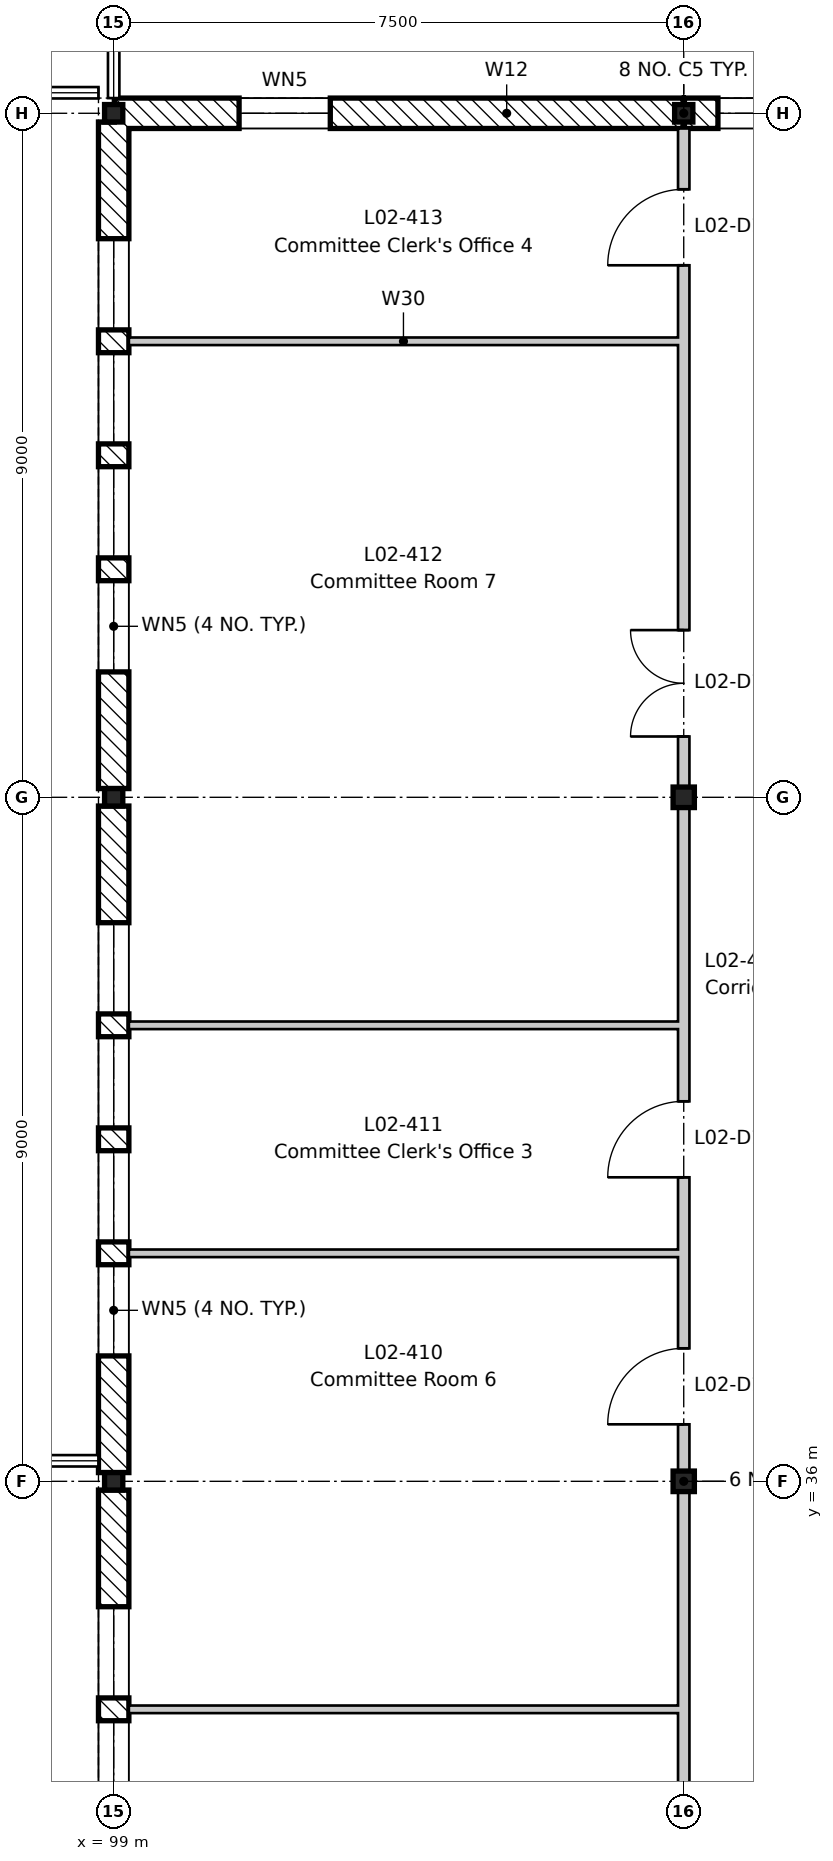
"""IFC4 building model, lengths in metres.
Left out: names, types, materials, properties, quantities, classifications, styles, units other than length and angle.
Written with IfcOpenShell. Run it as: python <this file> out.ifc"""

import sys

from ifc_helpers import new_model, si_unit, direction, frame, frame_2d, origin, origin_2d, place, context, subcontext, project, spatial, rectangle, i_section, extrude, element, fill, save


model = new_model("IFC4")
c1 = context("Model", 3, precision=1e-05, world=origin(), true_north=direction((0.0, 1.0)))
c2 = subcontext(c1, "Body", "Model", "MODEL_VIEW")
j1 = project(units=[si_unit("LENGTHUNIT", "METRE"), si_unit("PLANEANGLEUNIT", "RADIAN")], contexts=[c1])
p1 = place(None, origin())
s1 = spatial("IfcSite", under=j1, at=p1, CompositionType="ELEMENT")
p2 = place(p1, origin())
s2 = spatial("IfcBuilding", under=s1, at=p2, CompositionType="ELEMENT")
p3 = place(p2, frame((0.0, 0.0, 9.9)))
s3 = spatial("IfcBuildingStorey", under=s2, at=p3, CompositionType="ELEMENT", Elevation=9.9)
for number, where, z_axis, x_axis in (
    (1, (99.0, 36.0, -0.2), (0.0, 0.0, 1.0), (1.0, 0.0, 0.0)),
    (2, (99.0, 45.0, -0.2), (0.0, 0.0, 1.0), (1.0, 0.0, 0.0)),
    (3, (99.0, 54.0, -0.2), (0.0, 0.0, 1.0), (1.0, 0.0, 0.0)),
):
    element("IfcColumn", number, at=place(p3, frame(where, z_axis=z_axis, x_axis=x_axis)), inside=s3, PredefinedType="COLUMN", context=c2, shape_type="SweptSolid", body=[
        extrude(i_section(OverallWidth=0.24, OverallDepth=0.23, WebThickness=0.008, FlangeThickness=0.012, FilletRadius=0.021, at=origin_2d()), origin(), (0.0, 0.0, 1.0), 4.5),
    ])
for number, where, z_axis, x_axis in (
    (4, (106.5, 36.0, -0.2), (0.0, 0.0, 1.0), (1.0, 0.0, 0.0)),
    (5, (106.5, 45.0, -0.2), (0.0, 0.0, 1.0), (1.0, 0.0, 0.0)),
):
    element("IfcColumn", number, at=place(p3, frame(where, z_axis=z_axis, x_axis=x_axis)), inside=s3, PredefinedType="COLUMN", context=c2, shape_type="SweptSolid", body=[
        extrude(i_section(OverallWidth=0.28, OverallDepth=0.27, WebThickness=0.008, FlangeThickness=0.013, FilletRadius=0.024, at=origin_2d()), origin(), (0.0, 0.0, 1.0), 4.5),
    ])
p4 = place(p3, frame((106.5, 54.0, -0.2), z_axis=(0.0, 0.0, 1.0), x_axis=(1.0, 0.0, 0.0)))
e6 = element("IfcColumn", 6, at=p4, inside=s3, PredefinedType="COLUMN", context=c2, shape_type="SweptSolid", body=[
    extrude(i_section(OverallWidth=0.24, OverallDepth=0.23, WebThickness=0.008, FlangeThickness=0.012, FilletRadius=0.021, at=origin_2d()), origin(), (0.0, 0.0, 1.0), 4.5),
])
p5 = place(p3, frame((99.0, 27.115, 0.0), z_axis=(0.0, 0.0, 1.0), x_axis=(0.0, 1.0, 0.0)))
e7 = element("IfcWall", 7, at=p5, inside=s3, PredefinedType="STANDARD", context=c2, shape_type="SweptSolid", body=[
    extrude(rectangle(XDim=8.77, YDim=0.4, at=frame_2d((4.385, 0.0))), origin(), (0.0, 0.0, 1.0), 3.9),
])
p6 = place(p5, frame((1.535, 0.0, 0.6)))
e8 = element("IfcOpeningElement", 8, at=p6, cuts=e7, PredefinedType="OPENING", context=c2, shape_type="SweptSolid", body=[
    extrude(rectangle(XDim=1.2, YDim=3.0, at=frame_2d((0.6, 1.5))), frame((0.0, 0.21, 0.0), z_axis=(0.0, -1.0, 0.0), x_axis=(1.0, 0.0, 0.0)), (0.0, 0.0, 1.0), 0.42),
])
p7 = place(p5, frame((3.035, 0.0, 0.6)))
e9 = element("IfcOpeningElement", 9, at=p7, cuts=e7, PredefinedType="OPENING", context=c2, shape_type="SweptSolid", body=[
    extrude(rectangle(XDim=1.2, YDim=3.0, at=frame_2d((0.6, 1.5))), frame((0.0, 0.21, 0.0), z_axis=(0.0, -1.0, 0.0), x_axis=(1.0, 0.0, 0.0)), (0.0, 0.0, 1.0), 0.42),
])
p8 = place(p5, frame((4.535, 0.0, 0.6)))
e10 = element("IfcOpeningElement", 10, at=p8, cuts=e7, PredefinedType="OPENING", context=c2, shape_type="SweptSolid", body=[
    extrude(rectangle(XDim=1.2, YDim=3.0, at=frame_2d((0.6, 1.5))), frame((0.0, 0.21, 0.0), z_axis=(0.0, -1.0, 0.0), x_axis=(1.0, 0.0, 0.0)), (0.0, 0.0, 1.0), 0.42),
])
p9 = place(p5, frame((6.035, 0.0, 0.6)))
e11 = element("IfcOpeningElement", 11, at=p9, cuts=e7, PredefinedType="OPENING", context=c2, shape_type="SweptSolid", body=[
    extrude(rectangle(XDim=1.2, YDim=3.0, at=frame_2d((0.6, 1.5))), frame((0.0, 0.21, 0.0), z_axis=(0.0, -1.0, 0.0), x_axis=(1.0, 0.0, 0.0)), (0.0, 0.0, 1.0), 0.42),
])
p10 = place(p3, frame((99.0, 36.115, 0.0), z_axis=(0.0, 0.0, 1.0), x_axis=(0.0, 1.0, 0.0)))
e12 = element("IfcWall", 12, at=p10, inside=s3, PredefinedType="STANDARD", context=c2, shape_type="SweptSolid", body=[
    extrude(rectangle(XDim=8.77, YDim=0.4, at=frame_2d((4.385, 0.0))), origin(), (0.0, 0.0, 1.0), 3.9),
])
p11 = place(p10, frame((1.535, 0.0, 0.6)))
e13 = element("IfcOpeningElement", 13, at=p11, cuts=e12, PredefinedType="OPENING", context=c2, shape_type="SweptSolid", body=[
    extrude(rectangle(XDim=1.2, YDim=3.0, at=frame_2d((0.6, 1.5))), frame((0.0, 0.21, 0.0), z_axis=(0.0, -1.0, 0.0), x_axis=(1.0, 0.0, 0.0)), (0.0, 0.0, 1.0), 0.42),
])
p12 = place(p10, frame((3.035, 0.0, 0.6)))
e14 = element("IfcOpeningElement", 14, at=p12, cuts=e12, PredefinedType="OPENING", context=c2, shape_type="SweptSolid", body=[
    extrude(rectangle(XDim=1.2, YDim=3.0, at=frame_2d((0.6, 1.5))), frame((0.0, 0.21, 0.0), z_axis=(0.0, -1.0, 0.0), x_axis=(1.0, 0.0, 0.0)), (0.0, 0.0, 1.0), 0.42),
])
p13 = place(p10, frame((4.535, 0.0, 0.6)))
e15 = element("IfcOpeningElement", 15, at=p13, cuts=e12, PredefinedType="OPENING", context=c2, shape_type="SweptSolid", body=[
    extrude(rectangle(XDim=1.2, YDim=3.0, at=frame_2d((0.6, 1.5))), frame((0.0, 0.21, 0.0), z_axis=(0.0, -1.0, 0.0), x_axis=(1.0, 0.0, 0.0)), (0.0, 0.0, 1.0), 0.42),
])
p14 = place(p10, frame((6.035, 0.0, 0.6)))
e16 = element("IfcOpeningElement", 16, at=p14, cuts=e12, PredefinedType="OPENING", context=c2, shape_type="SweptSolid", body=[
    extrude(rectangle(XDim=1.2, YDim=3.0, at=frame_2d((0.6, 1.5))), frame((0.0, 0.21, 0.0), z_axis=(0.0, -1.0, 0.0), x_axis=(1.0, 0.0, 0.0)), (0.0, 0.0, 1.0), 0.42),
])
p15 = place(p3, frame((99.0, 45.115, 0.0), z_axis=(0.0, 0.0, 1.0), x_axis=(0.0, 1.0, 0.0)))
e17 = element("IfcWall", 17, at=p15, inside=s3, PredefinedType="STANDARD", context=c2, shape_type="SweptSolid", body=[
    extrude(rectangle(XDim=8.77, YDim=0.4, at=frame_2d((4.385, 0.0))), origin(), (0.0, 0.0, 1.0), 3.9),
])
p16 = place(p15, frame((1.535, 0.0, 0.6)))
e18 = element("IfcOpeningElement", 18, at=p16, cuts=e17, PredefinedType="OPENING", context=c2, shape_type="SweptSolid", body=[
    extrude(rectangle(XDim=1.2, YDim=3.0, at=frame_2d((0.6, 1.5))), frame((0.0, 0.21, 0.0), z_axis=(0.0, -1.0, 0.0), x_axis=(1.0, 0.0, 0.0)), (0.0, 0.0, 1.0), 0.42),
])
p17 = place(p15, frame((3.035, 0.0, 0.6)))
e19 = element("IfcOpeningElement", 19, at=p17, cuts=e17, PredefinedType="OPENING", context=c2, shape_type="SweptSolid", body=[
    extrude(rectangle(XDim=1.2, YDim=3.0, at=frame_2d((0.6, 1.5))), frame((0.0, 0.21, 0.0), z_axis=(0.0, -1.0, 0.0), x_axis=(1.0, 0.0, 0.0)), (0.0, 0.0, 1.0), 0.42),
])
p18 = place(p15, frame((4.535, 0.0, 0.6)))
e20 = element("IfcOpeningElement", 20, at=p18, cuts=e17, PredefinedType="OPENING", context=c2, shape_type="SweptSolid", body=[
    extrude(rectangle(XDim=1.2, YDim=3.0, at=frame_2d((0.6, 1.5))), frame((0.0, 0.21, 0.0), z_axis=(0.0, -1.0, 0.0), x_axis=(1.0, 0.0, 0.0)), (0.0, 0.0, 1.0), 0.42),
])
p19 = place(p15, frame((6.035, 0.0, 0.6)))
e21 = element("IfcOpeningElement", 21, at=p19, cuts=e17, PredefinedType="OPENING", context=c2, shape_type="SweptSolid", body=[
    extrude(rectangle(XDim=1.2, YDim=3.0, at=frame_2d((0.6, 1.5))), frame((0.0, 0.21, 0.0), z_axis=(0.0, -1.0, 0.0), x_axis=(1.0, 0.0, 0.0)), (0.0, 0.0, 1.0), 0.42),
])
p20 = place(p3, frame((99.009, 54.0, 0.0), z_axis=(0.0, 0.0, 1.0), x_axis=(1.0, 0.0, 0.0)))
e22 = element("IfcWall", 22, at=p20, inside=s3, PredefinedType="STANDARD", context=c2, shape_type="SweptSolid", body=[
    extrude(rectangle(XDim=7.482, YDim=0.4, at=frame_2d((3.741, 0.0))), origin(), (0.0, 0.0, 1.0), 3.97),
])
p21 = place(p20, frame((1.641, 0.0, 0.6)))
e23 = element("IfcOpeningElement", 23, at=p21, cuts=e22, PredefinedType="OPENING", context=c2, shape_type="SweptSolid", body=[
    extrude(rectangle(XDim=1.2, YDim=3.0, at=frame_2d((0.6, 1.5))), frame((0.0, 0.21, 0.0), z_axis=(0.0, -1.0, 0.0), x_axis=(1.0, 0.0, 0.0)), (0.0, 0.0, 1.0), 0.42),
])
p22 = place(p3, frame((106.509, 54.0, 0.0), z_axis=(0.0, 0.0, 1.0), x_axis=(1.0, 0.0, 0.0)))
e24 = element("IfcWall", 24, at=p22, inside=s3, PredefinedType="STANDARD", context=c2, shape_type="SweptSolid", body=[
    extrude(rectangle(XDim=2.982, YDim=0.4, at=frame_2d((1.491, 0.0))), origin(), (0.0, 0.0, 1.0), 4.1),
])
p23 = place(p22, frame((0.441, 0.0, 0.9)))
e25 = element("IfcOpeningElement", 25, at=p23, cuts=e24, PredefinedType="OPENING", context=c2, shape_type="SweptSolid", body=[
    extrude(rectangle(XDim=2.1, YDim=2.1, at=frame_2d((1.05, 1.05))), frame((0.0, 0.21, 0.0), z_axis=(0.0, -1.0, 0.0), x_axis=(1.0, 0.0, 0.0)), (0.0, 0.0, 1.0), 0.42),
])
for number, where, z_axis, x_axis in (
    (26, (99.2, 33.0, 0.0), (0.0, 0.0, 1.0), (1.0, 0.0, 0.0)),
    (27, (99.2, 39.0, 0.0), (0.0, 0.0, 1.0), (1.0, 0.0, 0.0)),
    (28, (99.2, 42.0, 0.0), (0.0, 0.0, 1.0), (1.0, 0.0, 0.0)),
    (29, (99.2, 51.0, 0.0), (0.0, 0.0, 1.0), (1.0, 0.0, 0.0)),
):
    element("IfcWall", number, at=place(p3, frame(where, z_axis=z_axis, x_axis=x_axis)), inside=s3, PredefinedType="PARTITIONING", context=c2, shape_type="SweptSolid", body=[
        extrude(rectangle(XDim=7.225, YDim=0.1, at=frame_2d((3.613, 0.0))), origin(), (0.0, 0.0, 1.0), 4.3),
    ])
p24 = place(p3, frame((106.5, 0.2, 0.0), z_axis=(0.0, 0.0, 1.0), x_axis=(0.0, 1.0, 0.0)))
e30 = element("IfcWall", 30, at=p24, inside=s3, PredefinedType="PARTITIONING", context=c2, shape_type="SweptSolid", body=[
    extrude(rectangle(XDim=53.6, YDim=0.15, at=frame_2d((26.8, 0.0))), origin(), (0.0, 0.0, 1.0), 3.78),
])
p25 = place(p24, frame((2.3, 0.0, 0.0)))
e31 = element("IfcOpeningElement", 31, at=p25, cuts=e30, PredefinedType="OPENING", context=c2, shape_type="SweptSolid", body=[
    extrude(rectangle(XDim=1.0, YDim=2.1, at=frame_2d((0.5, 1.05))), frame((0.0, 0.085, 0.0), z_axis=(0.0, -1.0, 0.0), x_axis=(1.0, 0.0, 0.0)), (0.0, 0.0, 1.0), 0.17),
])
p26 = place(p24, frame((6.8, 0.0, 0.0)))
e32 = element("IfcOpeningElement", 32, at=p26, cuts=e30, PredefinedType="OPENING", context=c2, shape_type="SweptSolid", body=[
    extrude(rectangle(XDim=1.0, YDim=2.1, at=frame_2d((0.5, 1.05))), frame((0.0, 0.085, 0.0), z_axis=(0.0, -1.0, 0.0), x_axis=(1.0, 0.0, 0.0)), (0.0, 0.0, 1.0), 0.17),
])
p27 = place(p24, frame((12.6, 0.0, 0.0)))
e33 = element("IfcOpeningElement", 33, at=p27, cuts=e30, PredefinedType="OPENING", context=c2, shape_type="SweptSolid", body=[
    extrude(rectangle(XDim=1.4, YDim=2.1, at=frame_2d((0.7, 1.05))), frame((0.0, 0.085, 0.0), z_axis=(0.0, -1.0, 0.0), x_axis=(1.0, 0.0, 0.0)), (0.0, 0.0, 1.0), 0.17),
])
p28 = place(p24, frame((20.3, 0.0, 0.0)))
e34 = element("IfcOpeningElement", 34, at=p28, cuts=e30, PredefinedType="OPENING", context=c2, shape_type="SweptSolid", body=[
    extrude(rectangle(XDim=1.0, YDim=2.1, at=frame_2d((0.5, 1.05))), frame((0.0, 0.085, 0.0), z_axis=(0.0, -1.0, 0.0), x_axis=(1.0, 0.0, 0.0)), (0.0, 0.0, 1.0), 0.17),
])
p29 = place(p24, frame((27.6, 0.0, 0.0)))
e35 = element("IfcOpeningElement", 35, at=p29, cuts=e30, PredefinedType="OPENING", context=c2, shape_type="SweptSolid", body=[
    extrude(rectangle(XDim=1.4, YDim=2.1, at=frame_2d((0.7, 1.05))), frame((0.0, 0.085, 0.0), z_axis=(0.0, -1.0, 0.0), x_axis=(1.0, 0.0, 0.0)), (0.0, 0.0, 1.0), 0.17),
])
p30 = place(p24, frame((36.55, 0.0, 0.0)))
e36 = element("IfcOpeningElement", 36, at=p30, cuts=e30, PredefinedType="OPENING", context=c2, shape_type="SweptSolid", body=[
    extrude(rectangle(XDim=1.0, YDim=2.1, at=frame_2d((0.5, 1.05))), frame((0.0, 0.085, 0.0), z_axis=(0.0, -1.0, 0.0), x_axis=(1.0, 0.0, 0.0)), (0.0, 0.0, 1.0), 0.17),
])
p31 = place(p24, frame((39.8, 0.0, 0.0)))
e37 = element("IfcOpeningElement", 37, at=p31, cuts=e30, PredefinedType="OPENING", context=c2, shape_type="SweptSolid", body=[
    extrude(rectangle(XDim=1.0, YDim=2.1, at=frame_2d((0.5, 1.05))), frame((0.0, 0.085, 0.0), z_axis=(0.0, -1.0, 0.0), x_axis=(1.0, 0.0, 0.0)), (0.0, 0.0, 1.0), 0.17),
])
p32 = place(p24, frame((45.6, 0.0, 0.0)))
e38 = element("IfcOpeningElement", 38, at=p32, cuts=e30, PredefinedType="OPENING", context=c2, shape_type="SweptSolid", body=[
    extrude(rectangle(XDim=1.4, YDim=2.1, at=frame_2d((0.7, 1.05))), frame((0.0, 0.085, 0.0), z_axis=(0.0, -1.0, 0.0), x_axis=(1.0, 0.0, 0.0)), (0.0, 0.0, 1.0), 0.17),
])
p33 = place(p24, frame((51.8, 0.0, 0.0)))
e39 = element("IfcOpeningElement", 39, at=p33, cuts=e30, PredefinedType="OPENING", context=c2, shape_type="SweptSolid", body=[
    extrude(rectangle(XDim=1.0, YDim=2.1, at=frame_2d((0.5, 1.05))), frame((0.0, 0.085, 0.0), z_axis=(0.0, -1.0, 0.0), x_axis=(1.0, 0.0, 0.0)), (0.0, 0.0, 1.0), 0.17),
])
p34 = place(p8, origin())
e40 = element("IfcWindow", 40, at=p34, inside=s3, PartitioningType="SINGLE_PANEL", PredefinedType="WINDOW", context=c2, shape_type="SweptSolid", body=[
    extrude(rectangle(XDim=1.2, YDim=3.0, at=frame_2d((0.6, 1.5))), frame((0.0, 0.03, 0.0), z_axis=(0.0, -1.0, 0.0), x_axis=(1.0, 0.0, 0.0)), (0.0, 0.0, 1.0), 0.06),
])
fill(e10, e40)
p35 = place(p9, origin())
e41 = element("IfcWindow", 41, at=p35, inside=s3, PartitioningType="SINGLE_PANEL", PredefinedType="WINDOW", context=c2, shape_type="SweptSolid", body=[
    extrude(rectangle(XDim=1.2, YDim=3.0, at=frame_2d((0.6, 1.5))), frame((0.0, 0.03, 0.0), z_axis=(0.0, -1.0, 0.0), x_axis=(1.0, 0.0, 0.0)), (0.0, 0.0, 1.0), 0.06),
])
fill(e11, e41)
p36 = place(p11, origin())
e42 = element("IfcWindow", 42, at=p36, inside=s3, PartitioningType="SINGLE_PANEL", PredefinedType="WINDOW", context=c2, shape_type="SweptSolid", body=[
    extrude(rectangle(XDim=1.2, YDim=3.0, at=frame_2d((0.6, 1.5))), frame((0.0, 0.03, 0.0), z_axis=(0.0, -1.0, 0.0), x_axis=(1.0, 0.0, 0.0)), (0.0, 0.0, 1.0), 0.06),
])
fill(e13, e42)
p37 = place(p12, origin())
e43 = element("IfcWindow", 43, at=p37, inside=s3, PartitioningType="SINGLE_PANEL", PredefinedType="WINDOW", context=c2, shape_type="SweptSolid", body=[
    extrude(rectangle(XDim=1.2, YDim=3.0, at=frame_2d((0.6, 1.5))), frame((0.0, 0.03, 0.0), z_axis=(0.0, -1.0, 0.0), x_axis=(1.0, 0.0, 0.0)), (0.0, 0.0, 1.0), 0.06),
])
fill(e14, e43)
p38 = place(p13, origin())
e44 = element("IfcWindow", 44, at=p38, inside=s3, PartitioningType="SINGLE_PANEL", PredefinedType="WINDOW", context=c2, shape_type="SweptSolid", body=[
    extrude(rectangle(XDim=1.2, YDim=3.0, at=frame_2d((0.6, 1.5))), frame((0.0, 0.03, 0.0), z_axis=(0.0, -1.0, 0.0), x_axis=(1.0, 0.0, 0.0)), (0.0, 0.0, 1.0), 0.06),
])
fill(e15, e44)
p39 = place(p14, origin())
e45 = element("IfcWindow", 45, at=p39, inside=s3, PartitioningType="SINGLE_PANEL", PredefinedType="WINDOW", context=c2, shape_type="SweptSolid", body=[
    extrude(rectangle(XDim=1.2, YDim=3.0, at=frame_2d((0.6, 1.5))), frame((0.0, 0.03, 0.0), z_axis=(0.0, -1.0, 0.0), x_axis=(1.0, 0.0, 0.0)), (0.0, 0.0, 1.0), 0.06),
])
fill(e16, e45)
p40 = place(p16, origin())
e46 = element("IfcWindow", 46, at=p40, inside=s3, PartitioningType="SINGLE_PANEL", PredefinedType="WINDOW", context=c2, shape_type="SweptSolid", body=[
    extrude(rectangle(XDim=1.2, YDim=3.0, at=frame_2d((0.6, 1.5))), frame((0.0, 0.03, 0.0), z_axis=(0.0, -1.0, 0.0), x_axis=(1.0, 0.0, 0.0)), (0.0, 0.0, 1.0), 0.06),
])
fill(e18, e46)
p41 = place(p17, origin())
e47 = element("IfcWindow", 47, at=p41, inside=s3, PartitioningType="SINGLE_PANEL", PredefinedType="WINDOW", context=c2, shape_type="SweptSolid", body=[
    extrude(rectangle(XDim=1.2, YDim=3.0, at=frame_2d((0.6, 1.5))), frame((0.0, 0.03, 0.0), z_axis=(0.0, -1.0, 0.0), x_axis=(1.0, 0.0, 0.0)), (0.0, 0.0, 1.0), 0.06),
])
fill(e19, e47)
p42 = place(p18, origin())
e48 = element("IfcWindow", 48, at=p42, inside=s3, PartitioningType="SINGLE_PANEL", PredefinedType="WINDOW", context=c2, shape_type="SweptSolid", body=[
    extrude(rectangle(XDim=1.2, YDim=3.0, at=frame_2d((0.6, 1.5))), frame((0.0, 0.03, 0.0), z_axis=(0.0, -1.0, 0.0), x_axis=(1.0, 0.0, 0.0)), (0.0, 0.0, 1.0), 0.06),
])
fill(e20, e48)
p43 = place(p19, origin())
e49 = element("IfcWindow", 49, at=p43, inside=s3, PartitioningType="SINGLE_PANEL", PredefinedType="WINDOW", context=c2, shape_type="SweptSolid", body=[
    extrude(rectangle(XDim=1.2, YDim=3.0, at=frame_2d((0.6, 1.5))), frame((0.0, 0.03, 0.0), z_axis=(0.0, -1.0, 0.0), x_axis=(1.0, 0.0, 0.0)), (0.0, 0.0, 1.0), 0.06),
])
fill(e21, e49)
p44 = place(p21, origin())
e50 = element("IfcWindow", 50, at=p44, inside=s3, PartitioningType="SINGLE_PANEL", PredefinedType="WINDOW", context=c2, shape_type="SweptSolid", body=[
    extrude(rectangle(XDim=1.2, YDim=3.0, at=frame_2d((0.6, 1.5))), frame((0.0, 0.03, 0.0), z_axis=(0.0, -1.0, 0.0), x_axis=(1.0, 0.0, 0.0)), (0.0, 0.0, 1.0), 0.06),
])
fill(e23, e50)
p45 = place(p23, origin())
e51 = element("IfcWindow", 51, at=p45, inside=s3, PartitioningType="SINGLE_PANEL", PredefinedType="WINDOW", context=c2, shape_type="SweptSolid", body=[
    extrude(rectangle(XDim=2.1, YDim=2.1, at=frame_2d((1.05, 1.05))), frame((0.0, 0.03, 0.0), z_axis=(0.0, -1.0, 0.0), x_axis=(1.0, 0.0, 0.0)), (0.0, 0.0, 1.0), 0.06),
])
fill(e25, e51)
p46 = place(p30, origin())
e52 = element("IfcDoor", 52, at=p46, inside=s3, OperationType="SINGLE_SWING_LEFT", PredefinedType="DOOR", context=c2, shape_type="SweptSolid", body=[
    extrude(rectangle(XDim=1.0, YDim=2.1, at=frame_2d((0.5, 1.05))), frame((0.0, 0.025, 0.0), z_axis=(0.0, -1.0, 0.0), x_axis=(1.0, 0.0, 0.0)), (0.0, 0.0, 1.0), 0.05),
])
fill(e36, e52)
p47 = place(p31, origin())
e53 = element("IfcDoor", 53, at=p47, inside=s3, OperationType="SINGLE_SWING_LEFT", PredefinedType="DOOR", context=c2, shape_type="SweptSolid", body=[
    extrude(rectangle(XDim=1.0, YDim=2.1, at=frame_2d((0.5, 1.05))), frame((0.0, 0.025, 0.0), z_axis=(0.0, -1.0, 0.0), x_axis=(1.0, 0.0, 0.0)), (0.0, 0.0, 1.0), 0.05),
])
fill(e37, e53)
p48 = place(p32, origin())
e54 = element("IfcDoor", 54, at=p48, inside=s3, OperationType="DOUBLE_DOOR_SINGLE_SWING", PredefinedType="DOOR", context=c2, shape_type="SweptSolid", body=[
    extrude(rectangle(XDim=1.4, YDim=2.1, at=frame_2d((0.7, 1.05))), frame((0.0, 0.025, 0.0), z_axis=(0.0, -1.0, 0.0), x_axis=(1.0, 0.0, 0.0)), (0.0, 0.0, 1.0), 0.05),
])
fill(e38, e54)
p49 = place(p33, origin())
e55 = element("IfcDoor", 55, at=p49, inside=s3, OperationType="SINGLE_SWING_LEFT", PredefinedType="DOOR", context=c2, shape_type="SweptSolid", body=[
    extrude(rectangle(XDim=1.0, YDim=2.1, at=frame_2d((0.5, 1.05))), frame((0.0, 0.025, 0.0), z_axis=(0.0, -1.0, 0.0), x_axis=(1.0, 0.0, 0.0)), (0.0, 0.0, 1.0), 0.05),
])
fill(e39, e55)
save(model, sys.argv[1])
